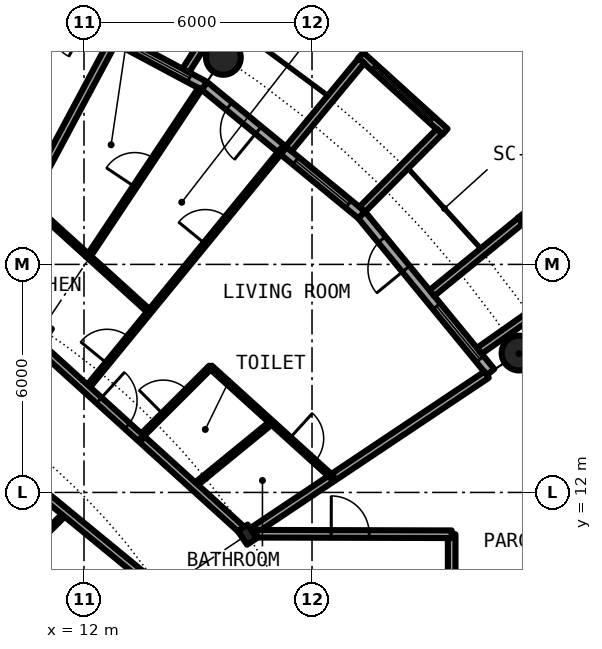
"""IFC4 building model, lengths in metres.
Left out: names, types, materials, properties, quantities, classifications, styles, units other than length and angle.
Written with IfcOpenShell. Run it as: python <this file> out.ifc"""

import sys

from ifc_helpers import new_model, si_unit, direction, frame, frame_2d, origin, origin_2d, place, context, subcontext, project, spatial, rectangle, circle, hollow_circle, i_section, extrude, element, fill, save


model = new_model("IFC4")
c1 = context("Model", 3, precision=1e-05, world=origin(), true_north=direction((0.0, 1.0)))
c2 = subcontext(c1, "Body", "Model", "MODEL_VIEW")
j1 = project(units=[si_unit("LENGTHUNIT", "METRE"), si_unit("PLANEANGLEUNIT", "RADIAN")], contexts=[c1])
p1 = place(None, origin())
s1 = spatial("IfcSite", under=j1, at=p1, CompositionType="ELEMENT")
p2 = place(p1, origin())
s2 = spatial("IfcBuilding", under=s1, at=p2, CompositionType="ELEMENT")
p3 = place(p2, frame((0.0, 0.0, 129.95)))
s3 = spatial("IfcBuildingStorey", under=s2, at=p3, CompositionType="ELEMENT", Elevation=129.95)
for number, where, z_axis, x_axis in (
    (1, (23.448, 15.667, 0.0), (0.0, 0.0, 1.0), (1.0, 0.0, 0.0)),
    (2, (15.667, 23.448, 0.0), (0.0, 0.0, 1.0), (1.0, 0.0, 0.0)),
):
    element("IfcColumn", number, at=place(p3, frame(where, z_axis=z_axis, x_axis=x_axis)), inside=s3, PredefinedType="COLUMN", context=c2, shape_type="SweptSolid", body=[
        extrude(hollow_circle(Radius=0.457, WallThickness=0.04, at=origin_2d()), origin(), (0.0, 0.0, 1.0), 3.05),
    ])
p4 = place(p3, frame((16.297, 10.889, 0.0), z_axis=(0.0, 0.0, 1.0), x_axis=(0.831469612303, 0.55557023302, 0.0)))
e3 = element("IfcColumn", 3, at=p4, inside=s3, PredefinedType="COLUMN", context=c2, shape_type="SweptSolid", body=[
    extrude(i_section(OverallWidth=0.307, OverallDepth=0.432, WebThickness=0.021, FlangeThickness=0.04, FilletRadius=0.027, at=origin_2d()), origin(), (0.0, 0.0, 1.0), 3.05),
])
p5 = place(p3, frame((22.699, 15.167, 0.0), z_axis=(0.0, 0.0, 1.0), x_axis=(-0.634382322723, 0.773019449054, 0.0)))
e4 = element("IfcWall", 4, at=p5, inside=s3, PredefinedType="SOLIDWALL", context=c2, shape_type="SweptSolid", body=[
    extrude(rectangle(XDim=5.352, YDim=0.25, at=frame_2d((2.676, 0.0))), origin(), (0.0, 0.0, 1.0), 2.7),
])
p6 = place(p5, frame((0.441, 0.0, 0.3)))
e5 = element("IfcOpeningElement", 5, at=p6, cuts=e4, PredefinedType="OPENING", context=c2, shape_type="SweptSolid", body=[
    extrude(rectangle(XDim=1.8, YDim=2.1, at=frame_2d((0.9, 1.05))), frame((0.0, 0.135, 0.0), z_axis=(0.0, -1.0, 0.0), x_axis=(1.0, 0.0, 0.0)), (0.0, 0.0, 1.0), 0.27),
])
p7 = place(p5, frame((3.51, 0.0, 0.0)))
e6 = element("IfcOpeningElement", 6, at=p7, cuts=e4, PredefinedType="OPENING", context=c2, shape_type="SweptSolid", body=[
    extrude(rectangle(XDim=1.0, YDim=2.2, at=frame_2d((0.5, 1.1))), frame((0.0, 0.135, 0.0), z_axis=(0.0, -1.0, 0.0), x_axis=(1.0, 0.0, 0.0)), (0.0, 0.0, 1.0), 0.27),
])
p8 = place(p3, frame((24.94, 17.382, -0.03), z_axis=(0.0, 0.0, 1.0), x_axis=(-0.603375996329, 0.797456837111, 0.0)))
e7 = element("IfcWall", 7, at=p8, inside=s3, PredefinedType="SOLIDWALL", context=c2, shape_type="SweptSolid", body=[
    extrude(rectangle(XDim=2.391, YDim=0.2, at=frame_2d((1.196, 0.0))), origin(), (0.0, 0.0, 1.0), 2.73),
])
p9 = place(p8, frame((0.156, 0.0, 0.33)))
e8 = element("IfcOpeningElement", 8, at=p9, cuts=e7, PredefinedType="OPENING", context=c2, shape_type="SweptSolid", body=[
    extrude(circle(Radius=1.04, at=frame_2d((1.04, 1.04))), frame((0.0, 0.11, 0.0), z_axis=(0.0, -1.0, 0.0), x_axis=(1.0, 0.0, 0.0)), (0.0, 0.0, 1.0), 0.22),
])
p10 = place(p3, frame((22.402, 15.726, -0.03), z_axis=(0.0, 0.0, 1.0), x_axis=(0.818275399393, 0.574826383135, 0.0)))
e9 = element("IfcWall", 9, at=p10, inside=s3, PredefinedType="SOLIDWALL", context=c2, shape_type="SweptSolid", body=[
    extrude(rectangle(XDim=2.929, YDim=0.2, at=frame_2d((1.465, 0.0))), origin(), (0.0, 0.0, 1.0), 2.73),
])
p11 = place(p3, frame((21.155, 17.246, -0.03), z_axis=(0.0, 0.0, 1.0), x_axis=(0.775179004516, 0.631741648902, 0.0)))
e10 = element("IfcWall", 10, at=p11, inside=s3, PredefinedType="SOLIDWALL", context=c2, shape_type="SweptSolid", body=[
    extrude(rectangle(XDim=3.006, YDim=0.2, at=frame_2d((1.503, 0.0))), origin(), (0.0, 0.0, 1.0), 2.73),
])
p12 = place(p3, frame((19.304, 19.304, 0.0), z_axis=(0.0, 0.0, 1.0), x_axis=(-0.773019449054, 0.634382322723, 0.0)))
e11 = element("IfcWall", 11, at=p12, inside=s3, PredefinedType="SOLIDWALL", context=c2, shape_type="SweptSolid", body=[
    extrude(rectangle(XDim=5.352, YDim=0.25, at=frame_2d((2.676, 0.0))), origin(), (0.0, 0.0, 1.0), 2.7),
])
p13 = place(p12, frame((0.441, 0.0, 0.3)))
e12 = element("IfcOpeningElement", 12, at=p13, cuts=e11, PredefinedType="OPENING", context=c2, shape_type="SweptSolid", body=[
    extrude(rectangle(XDim=1.8, YDim=2.1, at=frame_2d((0.9, 1.05))), frame((0.0, 0.135, 0.0), z_axis=(0.0, -1.0, 0.0), x_axis=(1.0, 0.0, 0.0)), (0.0, 0.0, 1.0), 0.27),
])
p14 = place(p12, frame((3.51, 0.0, 0.0)))
e13 = element("IfcOpeningElement", 13, at=p14, cuts=e11, PredefinedType="OPENING", context=c2, shape_type="SweptSolid", body=[
    extrude(rectangle(XDim=1.0, YDim=2.2, at=frame_2d((0.5, 1.1))), frame((0.0, 0.135, 0.0), z_axis=(0.0, -1.0, 0.0), x_axis=(1.0, 0.0, 0.0)), (0.0, 0.0, 1.0), 0.27),
])
p15 = place(p3, frame((21.5, 21.493, -0.03), z_axis=(0.0, 0.0, 1.0), x_axis=(-0.740998365753, 0.671506829416, 0.0)))
e14 = element("IfcWall", 14, at=p15, inside=s3, PredefinedType="SOLIDWALL", context=c2, shape_type="SweptSolid", body=[
    extrude(rectangle(XDim=2.993, YDim=0.2, at=frame_2d((1.497, 0.0))), origin(), (0.0, 0.0, 1.0), 2.73),
])
p16 = place(p15, frame((0.457, 0.0, 0.33)))
e15 = element("IfcOpeningElement", 15, at=p16, cuts=e14, PredefinedType="OPENING", context=c2, shape_type="SweptSolid", body=[
    extrude(circle(Radius=1.04, at=frame_2d((1.04, 1.04))), frame((0.0, 0.11, 0.0), z_axis=(0.0, -1.0, 0.0), x_axis=(1.0, 0.0, 0.0)), (0.0, 0.0, 1.0), 0.22),
])
p17 = place(p3, frame((19.323, 19.45, -0.03), z_axis=(0.0, 0.0, 1.0), x_axis=(0.704476739375, 0.709727076896, 0.0)))
e16 = element("IfcWall", 16, at=p17, inside=s3, PredefinedType="SOLIDWALL", context=c2, shape_type="SweptSolid", body=[
    extrude(rectangle(XDim=2.883, YDim=0.2, at=frame_2d((1.441, 0.0))), origin(), (0.0, 0.0, 1.0), 2.73),
])
p18 = place(p3, frame((17.384, 21.041, -0.03), z_axis=(0.0, 0.0, 1.0), x_axis=(0.63709551667, 0.770784861449, 0.0)))
e17 = element("IfcWall", 17, at=p18, inside=s3, PredefinedType="SOLIDWALL", context=c2, shape_type="SweptSolid", body=[
    extrude(rectangle(XDim=3.006, YDim=0.2, at=frame_2d((1.503, 0.0))), origin(), (0.0, 0.0, 1.0), 2.73),
])
p19 = place(p3, frame((15.167, 22.699, 0.0), z_axis=(0.0, 0.0, 1.0), x_axis=(-0.881915646801, 0.471407246368, 0.0)))
e18 = element("IfcWall", 18, at=p19, inside=s3, PredefinedType="SOLIDWALL", context=c2, shape_type="SweptSolid", body=[
    extrude(rectangle(XDim=5.352, YDim=0.25, at=frame_2d((2.676, 0.0))), origin(), (0.0, 0.0, 1.0), 2.7),
])
p20 = place(p19, frame((0.441, 0.0, 0.3)))
e19 = element("IfcOpeningElement", 19, at=p20, cuts=e18, PredefinedType="OPENING", context=c2, shape_type="SweptSolid", body=[
    extrude(rectangle(XDim=1.8, YDim=2.1, at=frame_2d((0.9, 1.05))), frame((0.0, 0.135, 0.0), z_axis=(0.0, -1.0, 0.0), x_axis=(1.0, 0.0, 0.0)), (0.0, 0.0, 1.0), 0.27),
])
p21 = place(p19, frame((3.51, 0.0, 0.0)))
e20 = element("IfcOpeningElement", 20, at=p21, cuts=e18, PredefinedType="OPENING", context=c2, shape_type="SweptSolid", body=[
    extrude(rectangle(XDim=1.0, YDim=2.2, at=frame_2d((0.5, 1.1))), frame((0.0, 0.135, 0.0), z_axis=(0.0, -1.0, 0.0), x_axis=(1.0, 0.0, 0.0)), (0.0, 0.0, 1.0), 0.27),
])
p22 = place(p3, frame((14.678, 23.102, -0.03), z_axis=(0.0, 0.0, 1.0), x_axis=(0.536001536573, 0.844217005746, 0.0)))
e21 = element("IfcWall", 21, at=p22, inside=s3, PredefinedType="SOLIDWALL", context=c2, shape_type="SweptSolid", body=[
    extrude(rectangle(XDim=2.929, YDim=0.2, at=frame_2d((1.465, 0.0))), origin(), (0.0, 0.0, 1.0), 2.73),
])
p23 = place(p3, frame((21.675, 9.2, 0.0), z_axis=(0.0, 0.0, 1.0), x_axis=(0.0, 1.0, 0.0)))
e22 = element("IfcWall", 22, at=p23, inside=s3, PredefinedType="PARTITIONING", context=c2, shape_type="SweptSolid", body=[
    extrude(rectangle(XDim=1.7, YDim=0.2, at=frame_2d((0.85, 0.0))), origin(), (0.0, 0.0, 1.0), 2.7),
])
p24 = place(p3, frame((9.239, 17.286, 0.0), z_axis=(0.0, 0.0, 1.0), x_axis=(0.471439510802, 0.881898399848, 0.0)))
e23 = element("IfcWall", 23, at=p24, inside=s3, PredefinedType="PARTITIONING", context=c2, shape_type="SweptSolid", body=[
    extrude(rectangle(XDim=7.575, YDim=0.2, at=frame_2d((3.787, 0.0))), origin(), (0.0, 0.0, 1.0), 2.7),
])
p25 = place(p3, frame((9.683, 9.632, 0.0), z_axis=(0.0, 0.0, 1.0), x_axis=(0.708796844581, 0.705412668665, 0.0)))
e24 = element("IfcWall", 24, at=p25, inside=s3, PredefinedType="PARTITIONING", context=c2, shape_type="SweptSolid", body=[
    extrude(rectangle(XDim=2.597, YDim=0.1, at=frame_2d((1.299, 0.0))), origin(), (0.0, 0.0, 1.0), 2.7),
])
p26 = place(p25, frame((0.849, 0.0, 0.0)))
e25 = element("IfcOpeningElement", 25, at=p26, cuts=e24, PredefinedType="OPENING", context=c2, shape_type="SweptSolid", body=[
    extrude(rectangle(XDim=0.9, YDim=2.3, at=frame_2d((0.45, 1.15))), frame((0.0, 0.06, 0.0), z_axis=(0.0, -1.0, 0.0), x_axis=(1.0, 0.0, 0.0)), (0.0, 0.0, 1.0), 0.12),
])
p27 = place(p3, frame((12.062, 14.727, 0.0), z_axis=(0.0, 0.0, 1.0), x_axis=(0.633664062855, 0.773608334654, 0.0)))
e26 = element("IfcWall", 26, at=p27, inside=s3, PredefinedType="PARTITIONING", context=c2, shape_type="SweptSolid", body=[
    extrude(rectangle(XDim=8.138, YDim=0.1, at=frame_2d((4.069, 0.0))), origin(), (0.0, 0.0, 1.0), 2.7),
])
p28 = place(p27, frame((0.861, 0.0, 0.0)))
e27 = element("IfcOpeningElement", 27, at=p28, cuts=e26, PredefinedType="OPENING", context=c2, shape_type="SweptSolid", body=[
    extrude(rectangle(XDim=0.9, YDim=2.3, at=frame_2d((0.45, 1.15))), frame((0.0, 0.06, 0.0), z_axis=(0.0, -1.0, 0.0), x_axis=(1.0, 0.0, 0.0)), (0.0, 0.0, 1.0), 0.12),
])
p29 = place(p27, frame((4.932, 0.0, 0.0)))
e28 = element("IfcOpeningElement", 28, at=p29, cuts=e26, PredefinedType="OPENING", context=c2, shape_type="SweptSolid", body=[
    extrude(rectangle(XDim=0.9, YDim=2.3, at=frame_2d((0.45, 1.15))), frame((0.0, 0.06, 0.0), z_axis=(0.0, -1.0, 0.0), x_axis=(1.0, 0.0, 0.0)), (0.0, 0.0, 1.0), 0.12),
])
p30 = place(p3, frame((12.118, 18.211, 0.0), z_axis=(0.0, 0.0, 1.0), x_axis=(0.553913391217, 0.832574294, 0.0)))
e29 = element("IfcWall", 29, at=p30, inside=s3, PredefinedType="PARTITIONING", context=c2, shape_type="SweptSolid", body=[
    extrude(rectangle(XDim=5.301, YDim=0.1, at=frame_2d((2.65, 0.0))), origin(), (0.0, 0.0, 1.0), 2.7),
])
p31 = place(p30, frame((2.2, 0.0, 0.0)))
e30 = element("IfcOpeningElement", 30, at=p31, cuts=e29, PredefinedType="OPENING", context=c2, shape_type="SweptSolid", body=[
    extrude(rectangle(XDim=0.9, YDim=2.3, at=frame_2d((0.45, 1.15))), frame((0.0, 0.06, 0.0), z_axis=(0.0, -1.0, 0.0), x_axis=(1.0, 0.0, 0.0)), (0.0, 0.0, 1.0), 0.12),
])
p32 = place(p3, frame((13.474, 13.448, 0.0), z_axis=(0.0, 0.0, 1.0), x_axis=(0.707851299421, 0.706361478217, 0.0)))
e31 = element("IfcWall", 31, at=p32, inside=s3, PredefinedType="PARTITIONING", context=c2, shape_type="SweptSolid", body=[
    extrude(rectangle(XDim=2.622, YDim=0.1, at=frame_2d((1.311, 0.0))), origin(), (0.0, 0.0, 1.0), 2.7),
])
p33 = place(p32, frame((0.861, 0.0, 0.0)))
e32 = element("IfcOpeningElement", 32, at=p33, cuts=e31, PredefinedType="OPENING", context=c2, shape_type="SweptSolid", body=[
    extrude(rectangle(XDim=0.9, YDim=2.3, at=frame_2d((0.45, 1.15))), frame((0.0, 0.06, 0.0), z_axis=(0.0, -1.0, 0.0), x_axis=(1.0, 0.0, 0.0)), (0.0, 0.0, 1.0), 0.12),
])
p34 = place(p3, frame((14.885, 12.168, 0.0), z_axis=(0.0, 0.0, 1.0), x_axis=(0.774162545943, 0.632986850147, 0.0)))
e33 = element("IfcWall", 33, at=p34, inside=s3, PredefinedType="PARTITIONING", context=c2, shape_type="SweptSolid", body=[
    extrude(rectangle(XDim=2.649, YDim=0.1, at=frame_2d((1.325, 0.0))), origin(), (0.0, 0.0, 1.0), 2.7),
])
p35 = place(p3, frame((16.477, 11.009, 0.0), z_axis=(0.0, 0.0, 1.0), x_axis=(0.831406593008, 0.555664536482, 0.0)))
e34 = element("IfcWall", 34, at=p35, inside=s3, PredefinedType="PARTITIONING", context=c2, shape_type="SweptSolid", body=[
    extrude(rectangle(XDim=7.358, YDim=0.2, at=frame_2d((3.679, 0.0))), origin(), (0.0, 0.0, 1.0), 2.7),
])
p36 = place(p3, frame((16.54, 10.913, 0.0), z_axis=(0.0, 0.0, 1.0), x_axis=(0.99999670426, -0.002567385634, 0.0)))
e35 = element("IfcWall", 35, at=p36, inside=s3, PredefinedType="PARTITIONING", context=c2, shape_type="SweptSolid", body=[
    extrude(rectangle(XDim=5.135, YDim=0.2, at=frame_2d((2.567, 0.0))), origin(), (0.0, 0.0, 1.0), 2.7),
])
p37 = place(p36, frame((1.965, 0.0, 0.0)))
e36 = element("IfcOpeningElement", 36, at=p37, cuts=e35, PredefinedType="OPENING", context=c2, shape_type="SweptSolid", body=[
    extrude(rectangle(XDim=1.0, YDim=2.3, at=frame_2d((0.5, 1.15))), frame((0.0, 0.11, 0.0), z_axis=(0.0, -1.0, 0.0), x_axis=(1.0, 0.0, 0.0)), (0.0, 0.0, 1.0), 0.22),
])
p38 = place(p3, frame((6.47, 15.613, 0.0), z_axis=(0.0, 0.0, 1.0), x_axis=(0.77292501819, -0.634497372931, 0.0)))
e37 = element("IfcWall", 37, at=p38, inside=s3, PredefinedType="PARTITIONING", context=c2, shape_type="SweptSolid", body=[
    extrude(rectangle(XDim=9.81, YDim=0.2, at=frame_2d((4.905, 0.0))), origin(), (0.0, 0.0, 1.0), 2.7),
])
p39 = place(p38, frame((4.404, 0.0, 0.0)))
e38 = element("IfcOpeningElement", 38, at=p39, cuts=e37, PredefinedType="OPENING", context=c2, shape_type="SweptSolid", body=[
    extrude(rectangle(XDim=1.0, YDim=2.3, at=frame_2d((0.5, 1.15))), frame((0.0, 0.11, 0.0), z_axis=(0.0, -1.0, 0.0), x_axis=(1.0, 0.0, 0.0)), (0.0, 0.0, 1.0), 0.22),
])
p40 = place(p3, frame((9.232, 17.289, 0.0), z_axis=(0.0, 0.0, 1.0), x_axis=(0.741112328493, -0.67138105168, 0.0)))
e39 = element("IfcWall", 39, at=p40, inside=s3, PredefinedType="PARTITIONING", context=c2, shape_type="SweptSolid", body=[
    extrude(rectangle(XDim=5.752, YDim=0.2, at=frame_2d((2.876, 0.0))), origin(), (0.0, 0.0, 1.0), 2.7),
])
p41 = place(p40, frame((4.27, 0.0, 0.0)))
e40 = element("IfcOpeningElement", 40, at=p41, cuts=e39, PredefinedType="OPENING", context=c2, shape_type="SweptSolid", body=[
    extrude(rectangle(XDim=1.0, YDim=2.3, at=frame_2d((0.5, 1.15))), frame((0.0, 0.11, 0.0), z_axis=(0.0, -1.0, 0.0), x_axis=(1.0, 0.0, 0.0)), (0.0, 0.0, 1.0), 0.22),
])
p42 = place(p3, frame((13.531, 13.394, 0.0), z_axis=(0.0, 0.0, 1.0), x_axis=(0.741095315462, -0.671399831249, 0.0)))
e41 = element("IfcWall", 41, at=p42, inside=s3, PredefinedType="PARTITIONING", context=c2, shape_type="SweptSolid", body=[
    extrude(rectangle(XDim=3.573, YDim=0.2, at=frame_2d((1.787, 0.0))), origin(), (0.0, 0.0, 1.0), 2.39),
])
p43 = place(p3, frame((10.509, 19.669, 0.0), z_axis=(0.0, 0.0, 1.0), x_axis=(0.7410823244, -0.671414170584, 0.0)))
e42 = element("IfcWall", 42, at=p43, inside=s3, PredefinedType="PARTITIONING", context=c2, shape_type="SweptSolid", body=[
    extrude(rectangle(XDim=4.338, YDim=0.1, at=frame_2d((2.169, 0.0))), origin(), (0.0, 0.0, 1.0), 2.7),
])
p44 = place(p3, frame((15.33, 15.3, 0.0), z_axis=(0.0, 0.0, 1.0), x_axis=(0.740948416939, -0.671561943112, 0.0)))
e43 = element("IfcWall", 43, at=p44, inside=s3, PredefinedType="PARTITIONING", context=c2, shape_type="SweptSolid", body=[
    extrude(rectangle(XDim=4.335, YDim=0.1, at=frame_2d((2.167, 0.0))), origin(), (0.0, 0.0, 1.0), 2.7),
])
p45 = place(p44, frame((2.803, 0.0, 0.0)))
e44 = element("IfcOpeningElement", 44, at=p45, cuts=e43, PredefinedType="OPENING", context=c2, shape_type="SweptSolid", body=[
    extrude(rectangle(XDim=0.9, YDim=2.3, at=frame_2d((0.45, 1.15))), frame((0.0, 0.06, 0.0), z_axis=(0.0, -1.0, 0.0), x_axis=(1.0, 0.0, 0.0)), (0.0, 0.0, 1.0), 0.12),
])
p46 = place(p6, origin())
e45 = element("IfcWindow", 45, at=p46, inside=s3, PartitioningType="SINGLE_PANEL", PredefinedType="WINDOW", context=c2, shape_type="SweptSolid", body=[
    extrude(rectangle(XDim=1.8, YDim=2.1, at=frame_2d((0.9, 1.05))), frame((0.0, 0.03, 0.0), z_axis=(0.0, -1.0, 0.0), x_axis=(1.0, 0.0, 0.0)), (0.0, 0.0, 1.0), 0.06),
])
fill(e5, e45)
p47 = place(p7, origin())
e46 = element("IfcDoor", 46, at=p47, inside=s3, OperationType="SINGLE_SWING_LEFT", PredefinedType="DOOR", context=c2, shape_type="SweptSolid", body=[
    extrude(rectangle(XDim=1.0, YDim=2.2, at=frame_2d((0.5, 1.1))), frame((0.0, 0.025, 0.0), z_axis=(0.0, -1.0, 0.0), x_axis=(1.0, 0.0, 0.0)), (0.0, 0.0, 1.0), 0.05),
])
fill(e6, e46)
p48 = place(p13, origin())
e47 = element("IfcWindow", 47, at=p48, inside=s3, PartitioningType="SINGLE_PANEL", PredefinedType="WINDOW", context=c2, shape_type="SweptSolid", body=[
    extrude(rectangle(XDim=1.8, YDim=2.1, at=frame_2d((0.9, 1.05))), frame((0.0, 0.03, 0.0), z_axis=(0.0, -1.0, 0.0), x_axis=(1.0, 0.0, 0.0)), (0.0, 0.0, 1.0), 0.06),
])
fill(e12, e47)
p49 = place(p16, origin())
e48 = element("IfcWindow", 48, at=p49, inside=s3, PartitioningType="SINGLE_PANEL", PredefinedType="WINDOW", context=c2, shape_type="SweptSolid", body=[
    extrude(circle(Radius=1.04, at=frame_2d((1.04, 1.04))), frame((0.0, 0.03, 0.0), z_axis=(0.0, -1.0, 0.0), x_axis=(1.0, 0.0, 0.0)), (0.0, 0.0, 1.0), 0.06),
])
fill(e15, e48)
p50 = place(p14, origin())
e49 = element("IfcDoor", 49, at=p50, inside=s3, OperationType="SINGLE_SWING_LEFT", PredefinedType="DOOR", context=c2, shape_type="SweptSolid", body=[
    extrude(rectangle(XDim=1.0, YDim=2.2, at=frame_2d((0.5, 1.1))), frame((0.0, 0.025, 0.0), z_axis=(0.0, -1.0, 0.0), x_axis=(1.0, 0.0, 0.0)), (0.0, 0.0, 1.0), 0.05),
])
fill(e13, e49)
p51 = place(p20, origin())
e50 = element("IfcWindow", 50, at=p51, inside=s3, PartitioningType="SINGLE_PANEL", PredefinedType="WINDOW", context=c2, shape_type="SweptSolid", body=[
    extrude(rectangle(XDim=1.8, YDim=2.1, at=frame_2d((0.9, 1.05))), frame((0.0, 0.03, 0.0), z_axis=(0.0, -1.0, 0.0), x_axis=(1.0, 0.0, 0.0)), (0.0, 0.0, 1.0), 0.06),
])
fill(e19, e50)
p52 = place(p41, origin())
e51 = element("IfcDoor", 51, at=p52, inside=s3, OperationType="SINGLE_SWING_RIGHT", PredefinedType="DOOR", context=c2, shape_type="SweptSolid", body=[
    extrude(rectangle(XDim=1.0, YDim=2.3, at=frame_2d((0.5, 1.15))), frame((0.0, 0.025, 0.0), z_axis=(0.0, -1.0, 0.0), x_axis=(1.0, 0.0, 0.0)), (0.0, 0.0, 1.0), 0.05),
])
fill(e40, e51)
p53 = place(p45, origin())
e52 = element("IfcDoor", 52, at=p53, inside=s3, OperationType="SINGLE_SWING_RIGHT", PredefinedType="DOOR", context=c2, shape_type="SweptSolid", body=[
    extrude(rectangle(XDim=0.9, YDim=2.3, at=frame_2d((0.45, 1.15))), frame((0.0, 0.025, 0.0), z_axis=(0.0, -1.0, 0.0), x_axis=(1.0, 0.0, 0.0)), (0.0, 0.0, 1.0), 0.05),
])
fill(e44, e52)
p54 = place(p33, origin())
e53 = element("IfcDoor", 53, at=p54, inside=s3, OperationType="SINGLE_SWING_LEFT", PredefinedType="DOOR", context=c2, shape_type="SweptSolid", body=[
    extrude(rectangle(XDim=0.9, YDim=2.3, at=frame_2d((0.45, 1.15))), frame((0.0, 0.025, 0.0), z_axis=(0.0, -1.0, 0.0), x_axis=(1.0, 0.0, 0.0)), (0.0, 0.0, 1.0), 0.05),
])
fill(e32, e53)
p55 = place(p28, origin())
e54 = element("IfcDoor", 54, at=p55, inside=s3, OperationType="SINGLE_SWING_LEFT", PredefinedType="DOOR", context=c2, shape_type="SweptSolid", body=[
    extrude(rectangle(XDim=0.9, YDim=2.3, at=frame_2d((0.45, 1.15))), frame((0.0, 0.025, 0.0), z_axis=(0.0, -1.0, 0.0), x_axis=(1.0, 0.0, 0.0)), (0.0, 0.0, 1.0), 0.05),
])
fill(e27, e54)
p56 = place(p29, origin())
e55 = element("IfcDoor", 55, at=p56, inside=s3, OperationType="SINGLE_SWING_RIGHT", PredefinedType="DOOR", context=c2, shape_type="SweptSolid", body=[
    extrude(rectangle(XDim=0.9, YDim=2.3, at=frame_2d((0.45, 1.15))), frame((0.0, 0.025, 0.0), z_axis=(0.0, -1.0, 0.0), x_axis=(1.0, 0.0, 0.0)), (0.0, 0.0, 1.0), 0.05),
])
fill(e28, e55)
p57 = place(p31, origin())
e56 = element("IfcDoor", 56, at=p57, inside=s3, OperationType="SINGLE_SWING_LEFT", PredefinedType="DOOR", context=c2, shape_type="SweptSolid", body=[
    extrude(rectangle(XDim=0.9, YDim=2.3, at=frame_2d((0.45, 1.15))), frame((0.0, 0.025, 0.0), z_axis=(0.0, -1.0, 0.0), x_axis=(1.0, 0.0, 0.0)), (0.0, 0.0, 1.0), 0.05),
])
fill(e30, e56)
p58 = place(p37, origin())
e57 = element("IfcDoor", 57, at=p58, inside=s3, OperationType="SINGLE_SWING_LEFT", PredefinedType="DOOR", context=c2, shape_type="SweptSolid", body=[
    extrude(rectangle(XDim=1.0, YDim=2.3, at=frame_2d((0.5, 1.15))), frame((0.0, 0.025, 0.0), z_axis=(0.0, -1.0, 0.0), x_axis=(1.0, 0.0, 0.0)), (0.0, 0.0, 1.0), 0.05),
])
fill(e36, e57)
save(model, sys.argv[1])
